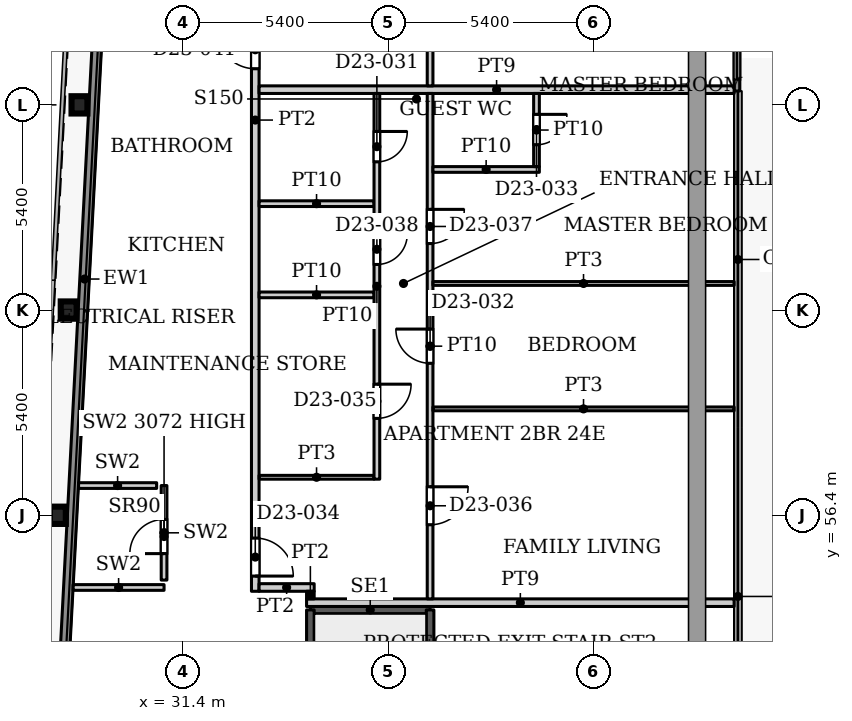
"""IFC4 building model, lengths in metres.
Left out: names, types, materials, properties, quantities, classifications, styles, units other than length and angle.
Written with IfcOpenShell. Run it as: python <this file> out.ifc"""

import sys

from ifc_helpers import new_model, si_unit, direction, frame, frame_2d, origin, origin_2d, place, context, subcontext, project, spatial, rectangle, i_section, extrude, source, transform, mapped, element, fill, save


model = new_model("IFC4")
c1 = context("Model", 3, precision=1e-05, world=origin(), true_north=direction((0.0, 1.0)))
c2 = subcontext(c1, "Body", "Model", "MODEL_VIEW")
j1 = project(units=[si_unit("LENGTHUNIT", "METRE"), si_unit("PLANEANGLEUNIT", "RADIAN")], contexts=[c1])
p1 = place(None, origin())
s1 = spatial("IfcSite", under=j1, at=p1, CompositionType="ELEMENT")
p2 = place(p1, origin())
s2 = spatial("IfcBuilding", under=s1, at=p2, CompositionType="ELEMENT")
p3 = place(p2, frame((0.0, 0.0, 105.8)))
s3 = spatial("IfcBuildingStorey", under=s2, at=p3, CompositionType="ELEMENT", Elevation=105.8)
for number, where, z_axis, x_axis in (
    (1, (28.106, 56.4, 0.0), (0.0, 0.0, 1.0), (1.0, 0.0, 0.0)),
    (2, (28.39, 61.8, 0.0), (0.0, 0.0, 1.0), (1.0, 0.0, 0.0)),
    (3, (28.674, 67.2, 0.0), (0.0, 0.0, 1.0), (1.0, 0.0, 0.0)),
):
    element("IfcColumn", number, at=place(p3, frame(where, z_axis=z_axis, x_axis=x_axis)), inside=s3, PredefinedType="COLUMN", context=c2, shape_type="SweptSolid", body=[
        extrude(i_section(OverallWidth=0.418, OverallDepth=0.455, WebThickness=0.042, FlangeThickness=0.068, FilletRadius=0.014, at=origin_2d()), origin(), (0.0, 0.0, 1.0), 3.9),
    ])
p4 = place(p3, frame((45.975, 69.965, 0.0), z_axis=(0.0, 0.0, 1.0), x_axis=(0.0, -1.0, 0.0)))
e4 = element("IfcWall", 4, at=p4, inside=s3, PredefinedType="SOLIDWALL", context=c2, shape_type="SweptSolid", body=[
    extrude(rectangle(XDim=2.4, YDim=0.15, at=frame_2d((1.2, 0.0))), origin(), (0.0, 0.0, 1.0), 3.75),
])
p5 = place(p4, frame((0.3, 0.0, 0.0)))
e5 = element("IfcOpeningElement", 5, at=p5, cuts=e4, PredefinedType="OPENING", context=c2, shape_type="SweptSolid", body=[
    extrude(rectangle(XDim=1.8, YDim=2.4, at=frame_2d((0.9, 1.2))), frame((0.0, 0.085, 0.0), z_axis=(0.0, -1.0, 0.0), x_axis=(1.0, 0.0, 0.0)), (0.0, 0.0, 1.0), 0.17),
])
p6 = place(p3, frame((27.195, 31.969, 0.0), z_axis=(0.0, 0.0, 1.0), x_axis=(0.052555284099, 0.998618016117, 0.0)))
e6 = element("IfcWall", 6, at=p6, inside=s3, PredefinedType="SOLIDWALL", context=c2, shape_type="SweptSolid", body=[
    extrude(rectangle(XDim=61.38, YDim=0.25, at=frame_2d((30.69, 0.0))), origin(), (0.0, 0.0, 1.0), 3.75),
])
p7 = place(p3, frame((34.75, 53.91, 0.0), z_axis=(0.0, 0.0, 1.0), x_axis=(1.0, 0.0, 0.0)))
e7 = element("IfcWall", 7, at=p7, inside=s3, PredefinedType="SHEAR", context=c2, shape_type="SweptSolid", body=[
    extrude(rectangle(XDim=3.15, YDim=0.2, at=frame_2d((1.575, 0.0))), origin(), (0.0, 0.0, 1.0), 3.9),
])
p8 = place(p3, frame((34.75, 47.5, 0.0), z_axis=(0.0, 0.0, 1.0), x_axis=(0.0, 1.0, 0.0)))
e8 = element("IfcWall", 8, at=p8, inside=s3, PredefinedType="SHEAR", context=c2, shape_type="SweptSolid", body=[
    extrude(rectangle(XDim=6.41, YDim=0.2, at=frame_2d((3.205, 0.0))), origin(), (0.0, 0.0, 1.0), 3.9),
])
p9 = place(p3, frame((37.9, 44.75, 0.0), z_axis=(0.0, 0.0, 1.0), x_axis=(0.0, 1.0, 0.0)))
e9 = element("IfcWall", 9, at=p9, inside=s3, PredefinedType="SHEAR", context=c2, shape_type="SweptSolid", body=[
    extrude(rectangle(XDim=9.16, YDim=0.2, at=frame_2d((4.58, 0.0))), origin(), (0.0, 0.0, 1.0), 3.9),
])
p10 = place(p3, frame((28.508, 54.5, 0.0), z_axis=(0.0, 0.0, 1.0), x_axis=(1.0, 0.0, 0.0)))
e10 = element("IfcWall", 10, at=p10, inside=s3, PredefinedType="PARTITIONING", context=c2, shape_type="SweptSolid", body=[
    extrude(rectangle(XDim=2.392, YDim=0.15, at=frame_2d((1.196, 0.0))), origin(), (0.0, 0.0, 1.0), 3.9),
])
p11 = place(p3, frame((30.9, 54.695, 0.0), z_axis=(0.0, 0.0, 1.0), x_axis=(0.0, 1.0, 0.0)))
e11 = element("IfcWall", 11, at=p11, inside=s3, PredefinedType="PARTITIONING", context=c2, shape_type="SweptSolid", body=[
    extrude(rectangle(XDim=2.487, YDim=0.15, at=frame_2d((1.243, 0.0))), origin(), (0.0, 0.0, 1.0), 3.072),
])
p12 = place(p11, frame((0.696, 0.0, 0.0)))
e12 = element("IfcOpeningElement", 12, at=p12, cuts=e11, PredefinedType="OPENING", context=c2, shape_type="SweptSolid", body=[
    extrude(rectangle(XDim=0.9, YDim=2.2, at=frame_2d((0.45, 1.1))), frame((0.0, 0.085, 0.0), z_axis=(0.0, -1.0, 0.0), x_axis=(1.0, 0.0, 0.0)), (0.0, 0.0, 1.0), 0.17),
])
p13 = place(p3, frame((28.65, 57.182, 0.0), z_axis=(0.0, 0.0, 1.0), x_axis=(1.0, 0.0, 0.0)))
e13 = element("IfcWall", 13, at=p13, inside=s3, PredefinedType="PARTITIONING", context=c2, shape_type="SweptSolid", body=[
    extrude(rectangle(XDim=2.055, YDim=0.15, at=frame_2d((1.028, 0.0))), origin(), (0.0, 0.0, 1.0), 3.9),
])
p14 = place(p3, frame((33.3, 54.4, 0.0), z_axis=(0.0, 0.0, 1.0), x_axis=(0.0, 1.0, 0.0)))
e14 = element("IfcWall", 14, at=p14, inside=s3, PredefinedType="PARTITIONING", context=c2, shape_type="SweptSolid", body=[
    extrude(rectangle(XDim=24.8, YDim=0.2, at=frame_2d((12.4, 0.0))), origin(), (0.0, 0.0, 1.0), 3.6),
])
p15 = place(p14, frame((0.4, 0.0, 0.0)))
e15 = element("IfcOpeningElement", 15, at=p15, cuts=e14, PredefinedType="OPENING", context=c2, shape_type="SweptSolid", body=[
    extrude(rectangle(XDim=1.0, YDim=2.1, at=frame_2d((0.5, 1.05))), frame((0.0, 0.11, 0.0), z_axis=(0.0, -1.0, 0.0), x_axis=(1.0, 0.0, 0.0)), (0.0, 0.0, 1.0), 0.22),
])
p16 = place(p14, frame((13.75, 0.0, 0.0)))
e16 = element("IfcOpeningElement", 16, at=p16, cuts=e14, PredefinedType="OPENING", context=c2, shape_type="SweptSolid", body=[
    extrude(rectangle(XDim=1.0, YDim=2.1, at=frame_2d((0.5, 1.05))), frame((0.0, 0.11, 0.0), z_axis=(0.0, -1.0, 0.0), x_axis=(1.0, 0.0, 0.0)), (0.0, 0.0, 1.0), 0.22),
])
p17 = place(p3, frame((33.4, 54.5, 0.0), z_axis=(0.0, 0.0, 1.0), x_axis=(1.0, 0.0, 0.0)))
e17 = element("IfcWall", 17, at=p17, inside=s3, PredefinedType="PARTITIONING", context=c2, shape_type="SweptSolid", body=[
    extrude(rectangle(XDim=1.45, YDim=0.2, at=frame_2d((0.725, 0.0))), origin(), (0.0, 0.0, 1.0), 3.6),
])
p18 = place(p3, frame((33.4, 57.4, 0.0), z_axis=(0.0, 0.0, 1.0), x_axis=(1.0, 0.0, 0.0)))
e18 = element("IfcWall", 18, at=p18, inside=s3, PredefinedType="PARTITIONING", context=c2, shape_type="SweptSolid", body=[
    extrude(rectangle(XDim=3.025, YDim=0.1, at=frame_2d((1.513, 0.0))), origin(), (0.0, 0.0, 1.0), 3.6),
])
for number, where, z_axis, x_axis in (
    (19, (33.4, 62.2, 0.0), (0.0, 0.0, 1.0), (1.0, 0.0, 0.0)),
    (20, (33.4, 64.6, 0.0), (0.0, 0.0, 1.0), (1.0, 0.0, 0.0)),
):
    element("IfcWall", number, at=place(p3, frame(where, z_axis=z_axis, x_axis=x_axis)), inside=s3, PredefinedType="PARTITIONING", context=c2, shape_type="SweptSolid", body=[
        extrude(rectangle(XDim=3.025, YDim=0.15, at=frame_2d((1.513, 0.0))), origin(), (0.0, 0.0, 1.0), 3.6),
    ])
p19 = place(p3, frame((33.4, 67.6, 0.0), z_axis=(0.0, 0.0, 1.0), x_axis=(1.0, 0.0, 0.0)))
e21 = element("IfcWall", 21, at=p19, inside=s3, PredefinedType="PARTITIONING", context=c2, shape_type="SweptSolid", body=[
    extrude(rectangle(XDim=12.5, YDim=0.2, at=frame_2d((6.25, 0.0))), origin(), (0.0, 0.0, 1.0), 3.6),
])
p20 = place(p3, frame((34.65, 54.1, 0.0), z_axis=(0.0, 0.0, 1.0), x_axis=(1.0, 0.0, 0.0)))
e22 = element("IfcWall", 22, at=p20, inside=s3, PredefinedType="PARTITIONING", context=c2, shape_type="SweptSolid", body=[
    extrude(rectangle(XDim=11.25, YDim=0.2, at=frame_2d((5.625, 0.0))), origin(), (0.0, 0.0, 1.0), 3.6),
])
p21 = place(p3, frame((34.75, 54.2, 0.0), z_axis=(0.0, 0.0, 1.0), x_axis=(0.0, 1.0, 0.0)))
e23 = element("IfcWall", 23, at=p21, inside=s3, PredefinedType="PARTITIONING", context=c2, shape_type="SweptSolid", body=[
    extrude(rectangle(XDim=0.2, YDim=0.2, at=frame_2d((0.1, 0.0))), origin(), (0.0, 0.0, 1.0), 3.6),
])
p22 = place(p3, frame((36.5, 57.35, 0.0), z_axis=(0.0, 0.0, 1.0), x_axis=(0.0, 1.0, 0.0)))
e24 = element("IfcWall", 24, at=p22, inside=s3, PredefinedType="PARTITIONING", context=c2, shape_type="SweptSolid", body=[
    extrude(rectangle(XDim=10.15, YDim=0.15, at=frame_2d((5.075, 0.0))), origin(), (0.0, 0.0, 1.0), 3.6),
])
p23 = place(p22, frame((8.35, 0.0, 0.0)))
e25 = element("IfcOpeningElement", 25, at=p23, cuts=e24, PredefinedType="OPENING", context=c2, shape_type="SweptSolid", body=[
    extrude(rectangle(XDim=0.8, YDim=2.1, at=frame_2d((0.4, 1.05))), frame((0.0, 0.085, 0.0), z_axis=(0.0, -1.0, 0.0), x_axis=(1.0, 0.0, 0.0)), (0.0, 0.0, 1.0), 0.17),
])
p24 = place(p22, frame((1.6, 0.0, 0.0)))
e26 = element("IfcOpeningElement", 26, at=p24, cuts=e24, PredefinedType="OPENING", context=c2, shape_type="SweptSolid", body=[
    extrude(rectangle(XDim=0.9, YDim=2.1, at=frame_2d((0.45, 1.05))), frame((0.0, 0.085, 0.0), z_axis=(0.0, -1.0, 0.0), x_axis=(1.0, 0.0, 0.0)), (0.0, 0.0, 1.0), 0.17),
])
p25 = place(p22, frame((5.65, 0.0, 0.0)))
e27 = element("IfcOpeningElement", 27, at=p25, cuts=e24, PredefinedType="OPENING", context=c2, shape_type="SweptSolid", body=[
    extrude(rectangle(XDim=0.8, YDim=2.1, at=frame_2d((0.4, 1.05))), frame((0.0, 0.085, 0.0), z_axis=(0.0, -1.0, 0.0), x_axis=(1.0, 0.0, 0.0)), (0.0, 0.0, 1.0), 0.17),
])
p26 = place(p3, frame((37.9, 54.2, 0.0), z_axis=(0.0, 0.0, 1.0), x_axis=(0.0, 1.0, 0.0)))
e28 = element("IfcWall", 28, at=p26, inside=s3, PredefinedType="PARTITIONING", context=c2, shape_type="SweptSolid", body=[
    extrude(rectangle(XDim=13.3, YDim=0.15, at=frame_2d((6.65, 0.0))), origin(), (0.0, 0.0, 1.0), 3.6),
])
p27 = place(p26, frame((6.2, 0.0, 0.0)))
e29 = element("IfcOpeningElement", 29, at=p27, cuts=e28, PredefinedType="OPENING", context=c2, shape_type="SweptSolid", body=[
    extrude(rectangle(XDim=0.9, YDim=2.1, at=frame_2d((0.45, 1.05))), frame((0.0, 0.085, 0.0), z_axis=(0.0, -1.0, 0.0), x_axis=(1.0, 0.0, 0.0)), (0.0, 0.0, 1.0), 0.17),
])
p28 = place(p26, frame((1.95, 0.0, 0.0)))
e30 = element("IfcOpeningElement", 30, at=p28, cuts=e28, PredefinedType="OPENING", context=c2, shape_type="SweptSolid", body=[
    extrude(rectangle(XDim=1.0, YDim=2.1, at=frame_2d((0.5, 1.05))), frame((0.0, 0.085, 0.0), z_axis=(0.0, -1.0, 0.0), x_axis=(1.0, 0.0, 0.0)), (0.0, 0.0, 1.0), 0.17),
])
p29 = place(p26, frame((9.35, 0.0, 0.0)))
e31 = element("IfcOpeningElement", 31, at=p29, cuts=e28, PredefinedType="OPENING", context=c2, shape_type="SweptSolid", body=[
    extrude(rectangle(XDim=0.9, YDim=2.1, at=frame_2d((0.45, 1.05))), frame((0.0, 0.085, 0.0), z_axis=(0.0, -1.0, 0.0), x_axis=(1.0, 0.0, 0.0)), (0.0, 0.0, 1.0), 0.17),
])
p30 = place(p3, frame((37.9, 67.7, 0.0), z_axis=(0.0, 0.0, 1.0), x_axis=(0.0, 1.0, 0.0)))
e32 = element("IfcWall", 32, at=p30, inside=s3, PredefinedType="PARTITIONING", context=c2, shape_type="SweptSolid", body=[
    extrude(rectangle(XDim=11.5, YDim=0.15, at=frame_2d((5.75, 0.0))), origin(), (0.0, 0.0, 1.0), 3.6),
])
p31 = place(p30, frame((4.55, 0.0, 0.0)))
e33 = element("IfcOpeningElement", 33, at=p31, cuts=e32, PredefinedType="OPENING", context=c2, shape_type="SweptSolid", body=[
    extrude(rectangle(XDim=0.9, YDim=2.1, at=frame_2d((0.45, 1.05))), frame((0.0, 0.085, 0.0), z_axis=(0.0, -1.0, 0.0), x_axis=(1.0, 0.0, 0.0)), (0.0, 0.0, 1.0), 0.17),
])
p32 = place(p30, frame((8.7, 0.0, 0.0)))
e34 = element("IfcOpeningElement", 34, at=p32, cuts=e32, PredefinedType="OPENING", context=c2, shape_type="SweptSolid", body=[
    extrude(rectangle(XDim=1.0, YDim=2.1, at=frame_2d((0.5, 1.05))), frame((0.0, 0.085, 0.0), z_axis=(0.0, -1.0, 0.0), x_axis=(1.0, 0.0, 0.0)), (0.0, 0.0, 1.0), 0.17),
])
p33 = place(p30, frame((1.1, 0.0, 0.0)))
e35 = element("IfcOpeningElement", 35, at=p33, cuts=e32, PredefinedType="OPENING", context=c2, shape_type="SweptSolid", body=[
    extrude(rectangle(XDim=0.9, YDim=2.1, at=frame_2d((0.45, 1.05))), frame((0.0, 0.085, 0.0), z_axis=(0.0, -1.0, 0.0), x_axis=(1.0, 0.0, 0.0)), (0.0, 0.0, 1.0), 0.17),
])
for number, where, z_axis, x_axis in (
    (36, (37.975, 59.2, 0.0), (0.0, 0.0, 1.0), (1.0, 0.0, 0.0)),
    (37, (37.975, 62.5, 0.0), (0.0, 0.0, 1.0), (1.0, 0.0, 0.0)),
):
    element("IfcWall", number, at=place(p3, frame(where, z_axis=z_axis, x_axis=x_axis)), inside=s3, PredefinedType="PARTITIONING", context=c2, shape_type="SweptSolid", body=[
        extrude(rectangle(XDim=7.925, YDim=0.1, at=frame_2d((3.962, 0.0))), origin(), (0.0, 0.0, 1.0), 3.6),
    ])
p34 = place(p3, frame((37.975, 65.5, 0.0), z_axis=(0.0, 0.0, 1.0), x_axis=(1.0, 0.0, 0.0)))
e38 = element("IfcWall", 38, at=p34, inside=s3, PredefinedType="PARTITIONING", context=c2, shape_type="SweptSolid", body=[
    extrude(rectangle(XDim=2.8, YDim=0.15, at=frame_2d((1.4, 0.0))), origin(), (0.0, 0.0, 1.0), 3.6),
])
p35 = place(p3, frame((40.7, 65.575, 0.0), z_axis=(0.0, 0.0, 1.0), x_axis=(0.0, 1.0, 0.0)))
e39 = element("IfcWall", 39, at=p35, inside=s3, PredefinedType="PARTITIONING", context=c2, shape_type="SweptSolid", body=[
    extrude(rectangle(XDim=1.925, YDim=0.15, at=frame_2d((0.962, 0.0))), origin(), (0.0, 0.0, 1.0), 3.6),
])
p36 = place(p35, frame((0.575, 0.0, 0.0)))
e40 = element("IfcOpeningElement", 40, at=p36, cuts=e39, PredefinedType="OPENING", context=c2, shape_type="SweptSolid", body=[
    extrude(rectangle(XDim=0.8, YDim=2.1, at=frame_2d((0.4, 1.05))), frame((0.0, 0.085, 0.0), z_axis=(0.0, -1.0, 0.0), x_axis=(1.0, 0.0, 0.0)), (0.0, 0.0, 1.0), 0.17),
])
m1 = source(origin(), c2, "Body", "SweptSolid", [
    extrude(rectangle(XDim=1.8, YDim=2.4, at=frame_2d((0.9, 1.2))), frame((0.0, 0.025, 0.0), z_axis=(0.0, -1.0, 0.0), x_axis=(1.0, 0.0, 0.0)), (0.0, 0.0, 1.0), 0.05),
])
p37 = place(p5, origin())
e41 = element("IfcDoor", 41, at=p37, inside=s3, OperationType="SLIDING_TO_LEFT", PredefinedType="DOOR", context=c2, shape_type="MappedRepresentation", body=[
    mapped(m1, transform((0.0, 0.0, 0.0), x_axis=(1.0, 0.0, 0.0), y_axis=(0.0, 1.0, 0.0), z_axis=(0.0, 0.0, 1.0), scale=1.0)),
])
fill(e5, e41)
m2 = source(origin(), c2, "Body", "SweptSolid", [
    extrude(rectangle(XDim=0.9, YDim=2.2, at=frame_2d((0.45, 1.1))), frame((0.0, 0.025, 0.0), z_axis=(0.0, -1.0, 0.0), x_axis=(1.0, 0.0, 0.0)), (0.0, 0.0, 1.0), 0.05),
])
p38 = place(p12, origin())
e42 = element("IfcDoor", 42, at=p38, inside=s3, OperationType="SINGLE_SWING_LEFT", PredefinedType="DOOR", context=c2, shape_type="MappedRepresentation", body=[
    mapped(m2, transform((0.0, 0.0, 0.0), x_axis=(1.0, 0.0, 0.0), y_axis=(0.0, 1.0, 0.0), z_axis=(0.0, 0.0, 1.0), scale=1.0)),
])
fill(e12, e42)
m3 = source(origin(), c2, "Body", "SweptSolid", [
    extrude(rectangle(XDim=0.8, YDim=2.1, at=frame_2d((0.4, 1.05))), frame((0.0, 0.025, 0.0), z_axis=(0.0, -1.0, 0.0), x_axis=(1.0, 0.0, 0.0)), (0.0, 0.0, 1.0), 0.05),
])
p39 = place(p23, origin())
e43 = element("IfcDoor", 43, at=p39, inside=s3, OperationType="SINGLE_SWING_RIGHT", PredefinedType="DOOR", context=c2, shape_type="MappedRepresentation", body=[
    mapped(m3, transform((0.0, 0.0, 0.0), x_axis=(1.0, 0.0, 0.0), y_axis=(0.0, 1.0, 0.0), z_axis=(0.0, 0.0, 1.0), scale=1.0)),
])
fill(e25, e43)
m4 = source(origin(), c2, "Body", "SweptSolid", [
    extrude(rectangle(XDim=0.9, YDim=2.1, at=frame_2d((0.45, 1.05))), frame((0.0, 0.025, 0.0), z_axis=(0.0, -1.0, 0.0), x_axis=(1.0, 0.0, 0.0)), (0.0, 0.0, 1.0), 0.05),
])
p40 = place(p27, origin())
e44 = element("IfcDoor", 44, at=p40, inside=s3, OperationType="SINGLE_SWING_LEFT", PredefinedType="DOOR", context=c2, shape_type="MappedRepresentation", body=[
    mapped(m4, transform((0.0, 0.0, 0.0), x_axis=(1.0, 0.0, 0.0), y_axis=(0.0, 1.0, 0.0), z_axis=(0.0, 0.0, 1.0), scale=1.0)),
])
fill(e29, e44)
p41 = place(p36, origin())
e45 = element("IfcDoor", 45, at=p41, inside=s3, OperationType="SINGLE_SWING_RIGHT", PredefinedType="DOOR", context=c2, shape_type="MappedRepresentation", body=[
    mapped(m3, transform((0.0, 0.0, 0.0), x_axis=(1.0, 0.0, 0.0), y_axis=(0.0, 1.0, 0.0), z_axis=(0.0, 0.0, 1.0), scale=1.0)),
])
fill(e40, e45)
m5 = source(origin(), c2, "Body", "SweptSolid", [
    extrude(rectangle(XDim=1.0, YDim=2.1, at=frame_2d((0.5, 1.05))), frame((0.0, 0.025, 0.0), z_axis=(0.0, -1.0, 0.0), x_axis=(1.0, 0.0, 0.0)), (0.0, 0.0, 1.0), 0.05),
])
p42 = place(p15, origin())
e46 = element("IfcDoor", 46, at=p42, inside=s3, OperationType="SINGLE_SWING_RIGHT", PredefinedType="DOOR", context=c2, shape_type="MappedRepresentation", body=[
    mapped(m5, transform((0.0, 0.0, 0.0), x_axis=(1.0, 0.0, 0.0), y_axis=(0.0, 1.0, 0.0), z_axis=(0.0, 0.0, 1.0), scale=1.0)),
])
fill(e15, e46)
p43 = place(p24, origin())
e47 = element("IfcDoor", 47, at=p43, inside=s3, OperationType="SINGLE_SWING_RIGHT", PredefinedType="DOOR", context=c2, shape_type="MappedRepresentation", body=[
    mapped(m4, transform((0.0, 0.0, 0.0), x_axis=(1.0, 0.0, 0.0), y_axis=(0.0, 1.0, 0.0), z_axis=(0.0, 0.0, 1.0), scale=1.0)),
])
fill(e26, e47)
m6 = source(origin(), c2, "Body", "SweptSolid", [
    extrude(rectangle(XDim=1.0, YDim=2.1, at=frame_2d((0.5, 1.05))), frame((0.0, 0.025, 0.0), z_axis=(0.0, -1.0, 0.0), x_axis=(1.0, 0.0, 0.0)), (0.0, 0.0, 1.0), 0.05),
])
p44 = place(p28, origin())
e48 = element("IfcDoor", 48, at=p44, inside=s3, OperationType="SINGLE_SWING_RIGHT", PredefinedType="DOOR", context=c2, shape_type="MappedRepresentation", body=[
    mapped(m6, transform((0.0, 0.0, 0.0), x_axis=(1.0, 0.0, 0.0), y_axis=(0.0, 1.0, 0.0), z_axis=(0.0, 0.0, 1.0), scale=1.0)),
])
fill(e30, e48)
p45 = place(p29, origin())
e49 = element("IfcDoor", 49, at=p45, inside=s3, OperationType="SINGLE_SWING_RIGHT", PredefinedType="DOOR", context=c2, shape_type="MappedRepresentation", body=[
    mapped(m4, transform((0.0, 0.0, 0.0), x_axis=(1.0, 0.0, 0.0), y_axis=(0.0, 1.0, 0.0), z_axis=(0.0, 0.0, 1.0), scale=1.0)),
])
fill(e31, e49)
p46 = place(p25, origin())
e50 = element("IfcDoor", 50, at=p46, inside=s3, OperationType="SINGLE_SWING_RIGHT", PredefinedType="DOOR", context=c2, shape_type="MappedRepresentation", body=[
    mapped(m3, transform((0.0, 0.0, 0.0), x_axis=(1.0, 0.0, 0.0), y_axis=(0.0, 1.0, 0.0), z_axis=(0.0, 0.0, 1.0), scale=1.0)),
])
fill(e27, e50)
p47 = place(p16, origin())
e51 = element("IfcDoor", 51, at=p47, inside=s3, OperationType="SINGLE_SWING_LEFT", PredefinedType="DOOR", context=c2, shape_type="MappedRepresentation", body=[
    mapped(m5, transform((0.0, 0.0, 0.0), x_axis=(1.0, 0.0, 0.0), y_axis=(0.0, 1.0, 0.0), z_axis=(0.0, 0.0, 1.0), scale=1.0)),
])
fill(e16, e51)
save(model, sys.argv[1])
